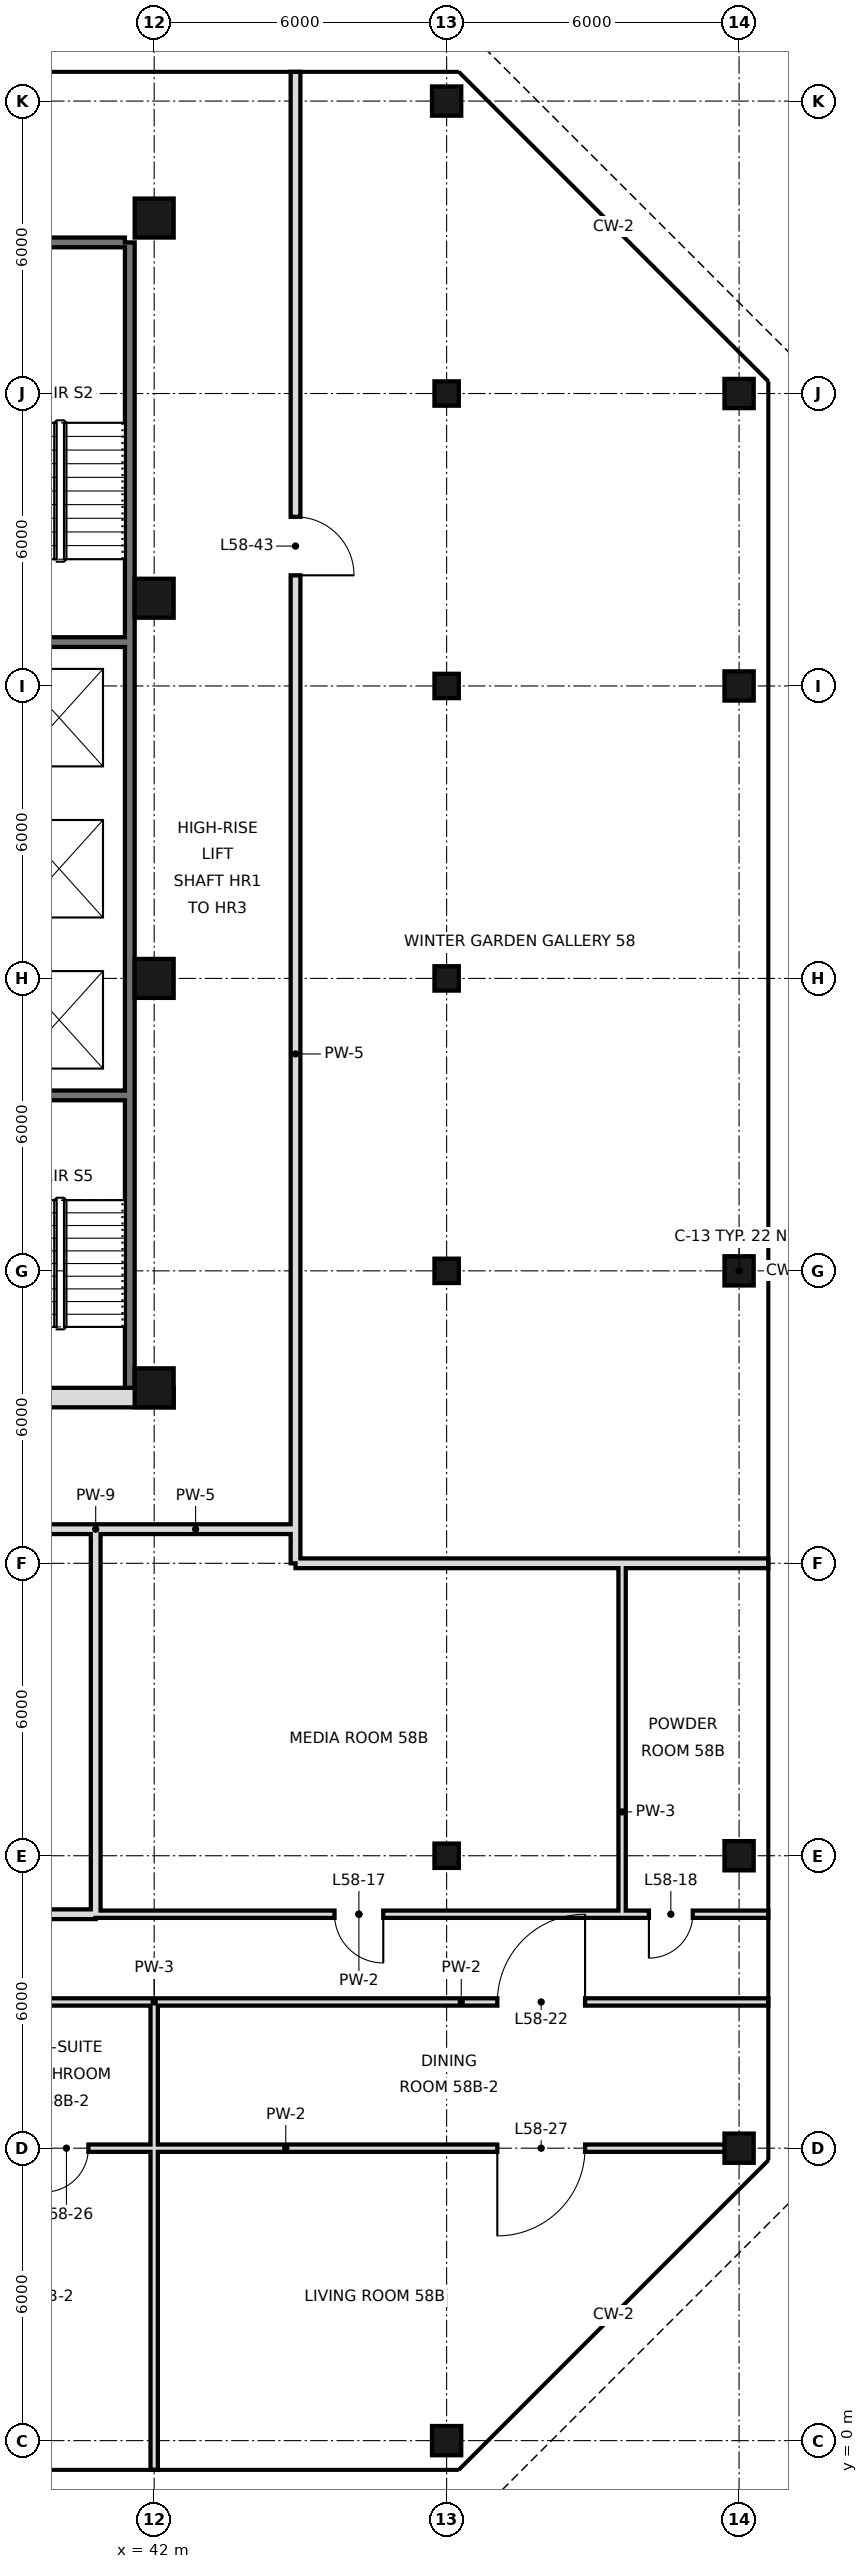
"""IFC4 building model, lengths in metres.
Left out: names, types, materials, properties, quantities, classifications, styles, units other than length and angle.
Written with IfcOpenShell. Run it as: python <this file> out.ifc"""

import sys

from ifc_helpers import new_model, si_unit, direction, frame, frame_2d, origin, origin_2d, place, context, subcontext, project, spatial, rectangle, hollow_rectangle, extrude, element, fill, save


model = new_model("IFC4")
c1 = context("Model", 3, precision=1e-05, world=origin(), true_north=direction((0.0, 1.0)))
c2 = subcontext(c1, "Body", "Model", "MODEL_VIEW")
j1 = project(units=[si_unit("LENGTHUNIT", "METRE"), si_unit("PLANEANGLEUNIT", "RADIAN")], contexts=[c1])
p1 = place(None, origin())
s1 = spatial("IfcSite", under=j1, at=p1, CompositionType="ELEMENT")
p2 = place(p1, origin())
s2 = spatial("IfcBuilding", under=s1, at=p2, CompositionType="ELEMENT")
p3 = place(p2, frame((0.0, 0.0, 246.8)))
s3 = spatial("IfcBuildingStorey", under=s2, at=p3, CompositionType="ELEMENT", Elevation=246.8)
for number, where, z_axis, x_axis in (
    (1, (42.0, 21.6, 0.0), (0.0, 0.0, 1.0), (1.0, 0.0, 0.0)),
    (2, (42.0, 30.0, 0.0), (0.0, 0.0, 1.0), (1.0, 0.0, 0.0)),
    (3, (42.0, 37.8, 0.0), (0.0, 0.0, 1.0), (1.0, 0.0, 0.0)),
    (4, (42.0, 45.6, 0.0), (0.0, 0.0, 1.0), (1.0, 0.0, 0.0)),
):
    element("IfcColumn", number, at=place(p3, frame(where, z_axis=z_axis, x_axis=x_axis)), inside=s3, PredefinedType="COLUMN", context=c2, shape_type="SweptSolid", body=[
        extrude(hollow_rectangle(XDim=0.8, YDim=0.8, WallThickness=0.032, at=origin_2d()), origin(), (0.0, 0.0, 1.0), 3.6),
    ])
p4 = place(p3, frame((48.0, 0.0, 0.0), z_axis=(0.0, 0.0, 1.0), x_axis=(1.0, 0.0, 0.0)))
e5 = element("IfcColumn", 5, at=p4, inside=s3, PredefinedType="COLUMN", context=c2, shape_type="SweptSolid", body=[
    extrude(hollow_rectangle(XDim=0.6, YDim=0.6, WallThickness=0.028, at=origin_2d()), origin(), (0.0, 0.0, 1.0), 3.6),
])
for number, where, z_axis, x_axis in (
    (6, (48.0, 12.0, 0.0), (0.0, 0.0, 1.0), (1.0, 0.0, 0.0)),
    (7, (48.0, 24.0, 0.0), (0.0, 0.0, 1.0), (1.0, 0.0, 0.0)),
    (8, (48.0, 30.0, 0.0), (0.0, 0.0, 1.0), (1.0, 0.0, 0.0)),
    (9, (48.0, 36.0, 0.0), (0.0, 0.0, 1.0), (1.0, 0.0, 0.0)),
    (10, (48.0, 42.0, 0.0), (0.0, 0.0, 1.0), (1.0, 0.0, 0.0)),
):
    element("IfcColumn", number, at=place(p3, frame(where, z_axis=z_axis, x_axis=x_axis)), inside=s3, PredefinedType="COLUMN", context=c2, shape_type="SweptSolid", body=[
        extrude(hollow_rectangle(XDim=0.5, YDim=0.5, WallThickness=0.025, at=origin_2d()), origin(), (0.0, 0.0, 1.0), 3.6),
    ])
for number, where, z_axis, x_axis in (
    (11, (48.0, 48.0, 0.0), (0.0, 0.0, 1.0), (1.0, 0.0, 0.0)),
    (12, (54.0, 6.0, 0.0), (0.0, 0.0, 1.0), (1.0, 0.0, 0.0)),
    (13, (54.0, 12.0, 0.0), (0.0, 0.0, 1.0), (1.0, 0.0, 0.0)),
    (14, (54.0, 24.0, 0.0), (0.0, 0.0, 1.0), (1.0, 0.0, 0.0)),
    (15, (54.0, 36.0, 0.0), (0.0, 0.0, 1.0), (1.0, 0.0, 0.0)),
    (16, (54.0, 42.0, 0.0), (0.0, 0.0, 1.0), (1.0, 0.0, 0.0)),
):
    element("IfcColumn", number, at=place(p3, frame(where, z_axis=z_axis, x_axis=x_axis)), inside=s3, PredefinedType="COLUMN", context=c2, shape_type="SweptSolid", body=[
        extrude(hollow_rectangle(XDim=0.6, YDim=0.6, WallThickness=0.028, at=origin_2d()), origin(), (0.0, 0.0, 1.0), 3.6),
    ])
p5 = place(p3, frame((40.8, 10.8, 0.0), z_axis=(0.0, 0.0, 1.0), x_axis=(0.0, 1.0, 0.0)))
e17 = element("IfcWall", 17, at=p5, inside=s3, PredefinedType="SOLIDWALL", context=c2, shape_type="SweptSolid", body=[
    extrude(rectangle(XDim=7.9, YDim=0.2, at=frame_2d((3.95, 0.0))), origin(), (0.0, 0.0, 1.0), 2.72),
])
p6 = place(p3, frame((42.0, -0.6, 0.0), z_axis=(0.0, 0.0, 1.0), x_axis=(0.0, 1.0, 0.0)))
e18 = element("IfcWall", 18, at=p6, inside=s3, PredefinedType="PARTITIONING", context=c2, shape_type="SweptSolid", body=[
    extrude(rectangle(XDim=6.6, YDim=0.15, at=frame_2d((3.3, 0.0))), origin(), (0.0, 0.0, 1.0), 2.72),
])
p7 = place(p3, frame((42.0, 6.0, 0.0), z_axis=(0.0, 0.0, 1.0), x_axis=(0.0, 1.0, 0.0)))
e19 = element("IfcWall", 19, at=p7, inside=s3, PredefinedType="PARTITIONING", context=c2, shape_type="SweptSolid", body=[
    extrude(rectangle(XDim=3.0, YDim=0.15, at=frame_2d((1.5, 0.0))), origin(), (0.0, 0.0, 1.0), 2.72),
])
p8 = place(p3, frame((44.9, 18.0, 0.0), z_axis=(0.0, 0.0, 1.0), x_axis=(0.0, 1.0, 0.0)))
e20 = element("IfcWall", 20, at=p8, inside=s3, PredefinedType="SOLIDWALL", context=c2, shape_type="SweptSolid", body=[
    extrude(rectangle(XDim=30.6, YDim=0.2, at=frame_2d((15.3, 0.0))), origin(), (0.0, 0.0, 1.0), 2.72),
])
p9 = place(p8, frame((20.27, 0.0, 0.0)))
e21 = element("IfcOpeningElement", 21, at=p9, cuts=e20, PredefinedType="OPENING", context=c2, shape_type="SweptSolid", body=[
    extrude(rectangle(XDim=1.2, YDim=2.4, at=frame_2d((0.6, 1.2))), frame((0.0, 0.11, 0.0), z_axis=(0.0, -1.0, 0.0), x_axis=(1.0, 0.0, 0.0)), (0.0, 0.0, 1.0), 0.22),
])
p10 = place(p3, frame((51.6, 10.8, 0.0), z_axis=(0.0, 0.0, 1.0), x_axis=(0.0, 1.0, 0.0)))
e22 = element("IfcWall", 22, at=p10, inside=s3, PredefinedType="PARTITIONING", context=c2, shape_type="SweptSolid", body=[
    extrude(rectangle(XDim=7.2, YDim=0.15, at=frame_2d((3.6, 0.0))), origin(), (0.0, 0.0, 1.0), 3.42),
])
p11 = place(p3, frame((35.4, 10.8, 0.0), z_axis=(0.0, 0.0, 1.0), x_axis=(1.0, 0.0, 0.0)))
e23 = element("IfcWall", 23, at=p11, inside=s3, PredefinedType="SOLIDWALL", context=c2, shape_type="SweptSolid", body=[
    extrude(rectangle(XDim=5.4, YDim=0.2, at=frame_2d((2.7, 0.0))), origin(), (0.0, 0.0, 1.0), 2.72),
])
p12 = place(p11, frame((2.2, 0.0, 0.0)))
e24 = element("IfcOpeningElement", 24, at=p12, cuts=e23, PredefinedType="OPENING", context=c2, shape_type="SweptSolid", body=[
    extrude(rectangle(XDim=1.0, YDim=2.4, at=frame_2d((0.5, 1.2))), frame((0.0, 0.11, 0.0), z_axis=(0.0, -1.0, 0.0), x_axis=(1.0, 0.0, 0.0)), (0.0, 0.0, 1.0), 0.22),
])
p13 = place(p3, frame((40.8, 10.8, 0.0), z_axis=(0.0, 0.0, 1.0), x_axis=(1.0, 0.0, 0.0)))
e25 = element("IfcWall", 25, at=p13, inside=s3, PredefinedType="PARTITIONING", context=c2, shape_type="SweptSolid", body=[
    extrude(rectangle(XDim=10.8, YDim=0.15, at=frame_2d((5.4, 0.0))), origin(), (0.0, 0.0, 1.0), 3.42),
])
p14 = place(p13, frame((4.9, 0.0, 0.0)))
e26 = element("IfcOpeningElement", 26, at=p14, cuts=e25, PredefinedType="OPENING", context=c2, shape_type="SweptSolid", body=[
    extrude(rectangle(XDim=1.0, YDim=2.4, at=frame_2d((0.5, 1.2))), frame((0.0, 0.085, 0.0), z_axis=(0.0, -1.0, 0.0), x_axis=(1.0, 0.0, 0.0)), (0.0, 0.0, 1.0), 0.17),
])
p15 = place(p3, frame((51.6, 10.8, 0.0), z_axis=(0.0, 0.0, 1.0), x_axis=(1.0, 0.0, 0.0)))
e27 = element("IfcWall", 27, at=p15, inside=s3, PredefinedType="PARTITIONING", context=c2, shape_type="SweptSolid", body=[
    extrude(rectangle(XDim=3.0, YDim=0.15, at=frame_2d((1.5, 0.0))), origin(), (0.0, 0.0, 1.0), 3.42),
])
p16 = place(p15, frame((0.55, 0.0, 0.0)))
e28 = element("IfcOpeningElement", 28, at=p16, cuts=e27, PredefinedType="OPENING", context=c2, shape_type="SweptSolid", body=[
    extrude(rectangle(XDim=0.9, YDim=2.4, at=frame_2d((0.45, 1.2))), frame((0.0, 0.085, 0.0), z_axis=(0.0, -1.0, 0.0), x_axis=(1.0, 0.0, 0.0)), (0.0, 0.0, 1.0), 0.17),
])
p17 = place(p3, frame((44.9, 18.0, 0.0), z_axis=(0.0, 0.0, 1.0), x_axis=(1.0, 0.0, 0.0)))
e29 = element("IfcWall", 29, at=p17, inside=s3, PredefinedType="SOLIDWALL", context=c2, shape_type="SweptSolid", body=[
    extrude(rectangle(XDim=9.7, YDim=0.2, at=frame_2d((4.85, 0.0))), origin(), (0.0, 0.0, 1.0), 2.72),
])
p18 = place(p3, frame((40.8, 18.7, 0.0), z_axis=(0.0, 0.0, 1.0), x_axis=(1.0, 0.0, 0.0)))
e30 = element("IfcWall", 30, at=p18, inside=s3, PredefinedType="SOLIDWALL", context=c2, shape_type="SweptSolid", body=[
    extrude(rectangle(XDim=4.1, YDim=0.2, at=frame_2d((2.05, 0.0))), origin(), (0.0, 0.0, 1.0), 2.72),
])
p19 = place(p3, frame((35.4, 18.7, 0.0), z_axis=(0.0, 0.0, 1.0), x_axis=(1.0, 0.0, 0.0)))
e31 = element("IfcWall", 31, at=p19, inside=s3, PredefinedType="SOLIDWALL", context=c2, shape_type="SweptSolid", body=[
    extrude(rectangle(XDim=5.4, YDim=0.2, at=frame_2d((2.7, 0.0))), origin(), (0.0, 0.0, 1.0), 3.42),
])
p20 = place(p3, frame((42.0, 6.0, 0.0), z_axis=(0.0, 0.0, 1.0), x_axis=(1.0, 0.0, 0.0)))
e32 = element("IfcWall", 32, at=p20, inside=s3, PredefinedType="PARTITIONING", context=c2, shape_type="SweptSolid", body=[
    extrude(rectangle(XDim=12.0, YDim=0.15, at=frame_2d((6.0, 0.0))), origin(), (0.0, 0.0, 1.0), 2.97),
])
p21 = place(p20, frame((7.04, 0.0, 0.0)))
e33 = element("IfcOpeningElement", 33, at=p21, cuts=e32, PredefinedType="OPENING", context=c2, shape_type="SweptSolid", body=[
    extrude(rectangle(XDim=1.8, YDim=2.4, at=frame_2d((0.9, 1.2))), frame((0.0, 0.085, 0.0), z_axis=(0.0, -1.0, 0.0), x_axis=(1.0, 0.0, 0.0)), (0.0, 0.0, 1.0), 0.17),
])
p22 = place(p3, frame((38.4, 6.0, 0.0), z_axis=(0.0, 0.0, 1.0), x_axis=(1.0, 0.0, 0.0)))
e34 = element("IfcWall", 34, at=p22, inside=s3, PredefinedType="PARTITIONING", context=c2, shape_type="SweptSolid", body=[
    extrude(rectangle(XDim=3.6, YDim=0.15, at=frame_2d((1.8, 0.0))), origin(), (0.0, 0.0, 1.0), 2.97),
])
p23 = place(p22, frame((1.35, 0.0, 0.0)))
e35 = element("IfcOpeningElement", 35, at=p23, cuts=e34, PredefinedType="OPENING", context=c2, shape_type="SweptSolid", body=[
    extrude(rectangle(XDim=0.9, YDim=2.4, at=frame_2d((0.45, 1.2))), frame((0.0, 0.085, 0.0), z_axis=(0.0, -1.0, 0.0), x_axis=(1.0, 0.0, 0.0)), (0.0, 0.0, 1.0), 0.17),
])
p24 = place(p3, frame((42.0, 9.0, 0.0), z_axis=(0.0, 0.0, 1.0), x_axis=(1.0, 0.0, 0.0)))
e36 = element("IfcWall", 36, at=p24, inside=s3, PredefinedType="PARTITIONING", context=c2, shape_type="SweptSolid", body=[
    extrude(rectangle(XDim=12.6, YDim=0.15, at=frame_2d((6.3, 0.0))), origin(), (0.0, 0.0, 1.0), 3.42),
])
p25 = place(p24, frame((7.04, 0.0, 0.0)))
e37 = element("IfcOpeningElement", 37, at=p25, cuts=e36, PredefinedType="OPENING", context=c2, shape_type="SweptSolid", body=[
    extrude(rectangle(XDim=1.8, YDim=2.4, at=frame_2d((0.9, 1.2))), frame((0.0, 0.085, 0.0), z_axis=(0.0, -1.0, 0.0), x_axis=(1.0, 0.0, 0.0)), (0.0, 0.0, 1.0), 0.17),
])
p26 = place(p3, frame((38.4, 9.0, 0.0), z_axis=(0.0, 0.0, 1.0), x_axis=(1.0, 0.0, 0.0)))
e38 = element("IfcWall", 38, at=p26, inside=s3, PredefinedType="PARTITIONING", context=c2, shape_type="SweptSolid", body=[
    extrude(rectangle(XDim=3.6, YDim=0.15, at=frame_2d((1.8, 0.0))), origin(), (0.0, 0.0, 1.0), 3.42),
])
p27 = place(p3, frame((41.5, 21.6, 0.0), z_axis=(0.0, 0.0, 1.0), x_axis=(0.0, 1.0, 0.0)))
e39 = element("IfcWall", 39, at=p27, inside=s3, PredefinedType="SOLIDWALL", context=c2, shape_type="SweptSolid", body=[
    extrude(rectangle(XDim=23.5, YDim=0.2, at=frame_2d((11.75, 0.0))), origin(), (0.0, 0.0, 1.0), 3.42),
])
p28 = place(p3, frame((6.6, 45.1, 0.0), z_axis=(0.0, 0.0, 1.0), x_axis=(1.0, 0.0, 0.0)))
e40 = element("IfcWall", 40, at=p28, inside=s3, PredefinedType="SOLIDWALL", context=c2, shape_type="SweptSolid", body=[
    extrude(rectangle(XDim=34.8, YDim=0.2, at=frame_2d((17.4, 0.0))), origin(), (0.0, 0.0, 1.0), 3.42),
])
p29 = place(p3, frame((5.6, 21.4, 0.0), z_axis=(0.0, 0.0, 1.0), x_axis=(1.0, 0.0, 0.0)))
e41 = element("IfcWall", 41, at=p29, inside=s3, PredefinedType="SOLIDWALL", context=c2, shape_type="SweptSolid", body=[
    extrude(rectangle(XDim=36.8, YDim=0.4, at=frame_2d((18.4, 0.0))), origin(), (0.0, 0.0, 1.0), 3.42),
])
p30 = place(p29, frame((8.5, 0.0, 0.0)))
e42 = element("IfcOpeningElement", 42, at=p30, cuts=e41, PredefinedType="OPENING", context=c2, shape_type="SweptSolid", body=[
    extrude(rectangle(XDim=1.8, YDim=2.1, at=frame_2d((0.9, 1.05))), frame((0.0, 0.21, 0.0), z_axis=(0.0, -1.0, 0.0), x_axis=(1.0, 0.0, 0.0)), (0.0, 0.0, 1.0), 0.42),
])
p31 = place(p29, frame((17.5, 0.0, 0.0)))
e43 = element("IfcOpeningElement", 43, at=p31, cuts=e41, PredefinedType="OPENING", context=c2, shape_type="SweptSolid", body=[
    extrude(rectangle(XDim=1.8, YDim=2.1, at=frame_2d((0.9, 1.05))), frame((0.0, 0.21, 0.0), z_axis=(0.0, -1.0, 0.0), x_axis=(1.0, 0.0, 0.0)), (0.0, 0.0, 1.0), 0.42),
])
p32 = place(p29, frame((26.5, 0.0, 0.0)))
e44 = element("IfcOpeningElement", 44, at=p32, cuts=e41, PredefinedType="OPENING", context=c2, shape_type="SweptSolid", body=[
    extrude(rectangle(XDim=1.8, YDim=2.1, at=frame_2d((0.9, 1.05))), frame((0.0, 0.21, 0.0), z_axis=(0.0, -1.0, 0.0), x_axis=(1.0, 0.0, 0.0)), (0.0, 0.0, 1.0), 0.42),
])
p33 = place(p29, frame((4.5, 0.0, 0.0)))
e45 = element("IfcOpeningElement", 45, at=p33, cuts=e41, PredefinedType="OPENING", context=c2, shape_type="SweptSolid", body=[
    extrude(rectangle(XDim=1.2, YDim=2.1, at=frame_2d((0.6, 1.05))), frame((0.0, 0.21, 0.0), z_axis=(0.0, -1.0, 0.0), x_axis=(1.0, 0.0, 0.0)), (0.0, 0.0, 1.0), 0.42),
])
p34 = place(p29, frame((31.1, 0.0, 0.0)))
e46 = element("IfcOpeningElement", 46, at=p34, cuts=e41, PredefinedType="OPENING", context=c2, shape_type="SweptSolid", body=[
    extrude(rectangle(XDim=1.2, YDim=2.1, at=frame_2d((0.6, 1.05))), frame((0.0, 0.21, 0.0), z_axis=(0.0, -1.0, 0.0), x_axis=(1.0, 0.0, 0.0)), (0.0, 0.0, 1.0), 0.42),
])
p35 = place(p3, frame((36.1, 27.6, 0.0), z_axis=(0.0, 0.0, 1.0), x_axis=(1.0, 0.0, 0.0)))
e47 = element("IfcWall", 47, at=p35, inside=s3, PredefinedType="SOLIDWALL", context=c2, shape_type="SweptSolid", body=[
    extrude(rectangle(XDim=5.3, YDim=0.2, at=frame_2d((2.65, 0.0))), origin(), (0.0, 0.0, 1.0), 3.42),
])
p36 = place(p3, frame((38.7, 36.9, 0.0), z_axis=(0.0, 0.0, 1.0), x_axis=(1.0, 0.0, 0.0)))
e48 = element("IfcWall", 48, at=p36, inside=s3, PredefinedType="SOLIDWALL", context=c2, shape_type="SweptSolid", body=[
    extrude(rectangle(XDim=2.7, YDim=0.2, at=frame_2d((1.35, 0.0))), origin(), (0.0, 0.0, 1.0), 3.42),
])
p37 = place(p14, origin())
e49 = element("IfcDoor", 49, at=p37, inside=s3, OperationType="SINGLE_SWING_RIGHT", PredefinedType="DOOR", context=c2, shape_type="SweptSolid", body=[
    extrude(rectangle(XDim=1.0, YDim=2.4, at=frame_2d((0.5, 1.2))), frame((0.0, 0.025, 0.0), z_axis=(0.0, -1.0, 0.0), x_axis=(1.0, 0.0, 0.0)), (0.0, 0.0, 1.0), 0.05),
])
fill(e26, e49)
p38 = place(p16, frame((0.9, 0.0, 0.0), z_axis=(0.0, 0.0, 1.0), x_axis=(-1.0, 0.0, 0.0)))
e50 = element("IfcDoor", 50, at=p38, inside=s3, OperationType="SINGLE_SWING_RIGHT", PredefinedType="DOOR", context=c2, shape_type="SweptSolid", body=[
    extrude(rectangle(XDim=0.9, YDim=2.4, at=frame_2d((0.45, 1.2))), frame((0.0, 0.025, 0.0), z_axis=(0.0, -1.0, 0.0), x_axis=(1.0, 0.0, 0.0)), (0.0, 0.0, 1.0), 0.05),
])
fill(e28, e50)
p39 = place(p25, frame((1.8, 0.0, 0.0), z_axis=(0.0, 0.0, 1.0), x_axis=(-1.0, 0.0, 0.0)))
e51 = element("IfcDoor", 51, at=p39, inside=s3, OperationType="SINGLE_SWING_LEFT", PredefinedType="DOOR", context=c2, shape_type="SweptSolid", body=[
    extrude(rectangle(XDim=1.8, YDim=2.4, at=frame_2d((0.9, 1.2))), frame((0.0, 0.025, 0.0), z_axis=(0.0, -1.0, 0.0), x_axis=(1.0, 0.0, 0.0)), (0.0, 0.0, 1.0), 0.05),
])
fill(e37, e51)
p40 = place(p23, frame((0.9, 0.0, 0.0), z_axis=(0.0, 0.0, 1.0), x_axis=(-1.0, 0.0, 0.0)))
e52 = element("IfcDoor", 52, at=p40, inside=s3, OperationType="SINGLE_SWING_RIGHT", PredefinedType="DOOR", context=c2, shape_type="SweptSolid", body=[
    extrude(rectangle(XDim=0.9, YDim=2.4, at=frame_2d((0.45, 1.2))), frame((0.0, 0.025, 0.0), z_axis=(0.0, -1.0, 0.0), x_axis=(1.0, 0.0, 0.0)), (0.0, 0.0, 1.0), 0.05),
])
fill(e35, e52)
p41 = place(p21, frame((1.8, 0.0, 0.0), z_axis=(0.0, 0.0, 1.0), x_axis=(-1.0, 0.0, 0.0)))
e53 = element("IfcDoor", 53, at=p41, inside=s3, OperationType="SINGLE_SWING_RIGHT", PredefinedType="DOOR", context=c2, shape_type="SweptSolid", body=[
    extrude(rectangle(XDim=1.8, YDim=2.4, at=frame_2d((0.9, 1.2))), frame((0.0, 0.025, 0.0), z_axis=(0.0, -1.0, 0.0), x_axis=(1.0, 0.0, 0.0)), (0.0, 0.0, 1.0), 0.05),
])
fill(e33, e53)
p42 = place(p9, frame((1.2, 0.0, 0.0), z_axis=(0.0, 0.0, 1.0), x_axis=(-1.0, 0.0, 0.0)))
e54 = element("IfcDoor", 54, at=p42, inside=s3, OperationType="SINGLE_SWING_RIGHT", PredefinedType="DOOR", context=c2, shape_type="SweptSolid", body=[
    extrude(rectangle(XDim=1.2, YDim=2.4, at=frame_2d((0.6, 1.2))), frame((0.0, 0.025, 0.0), z_axis=(0.0, -1.0, 0.0), x_axis=(1.0, 0.0, 0.0)), (0.0, 0.0, 1.0), 0.05),
])
fill(e21, e54)
save(model, sys.argv[1])
